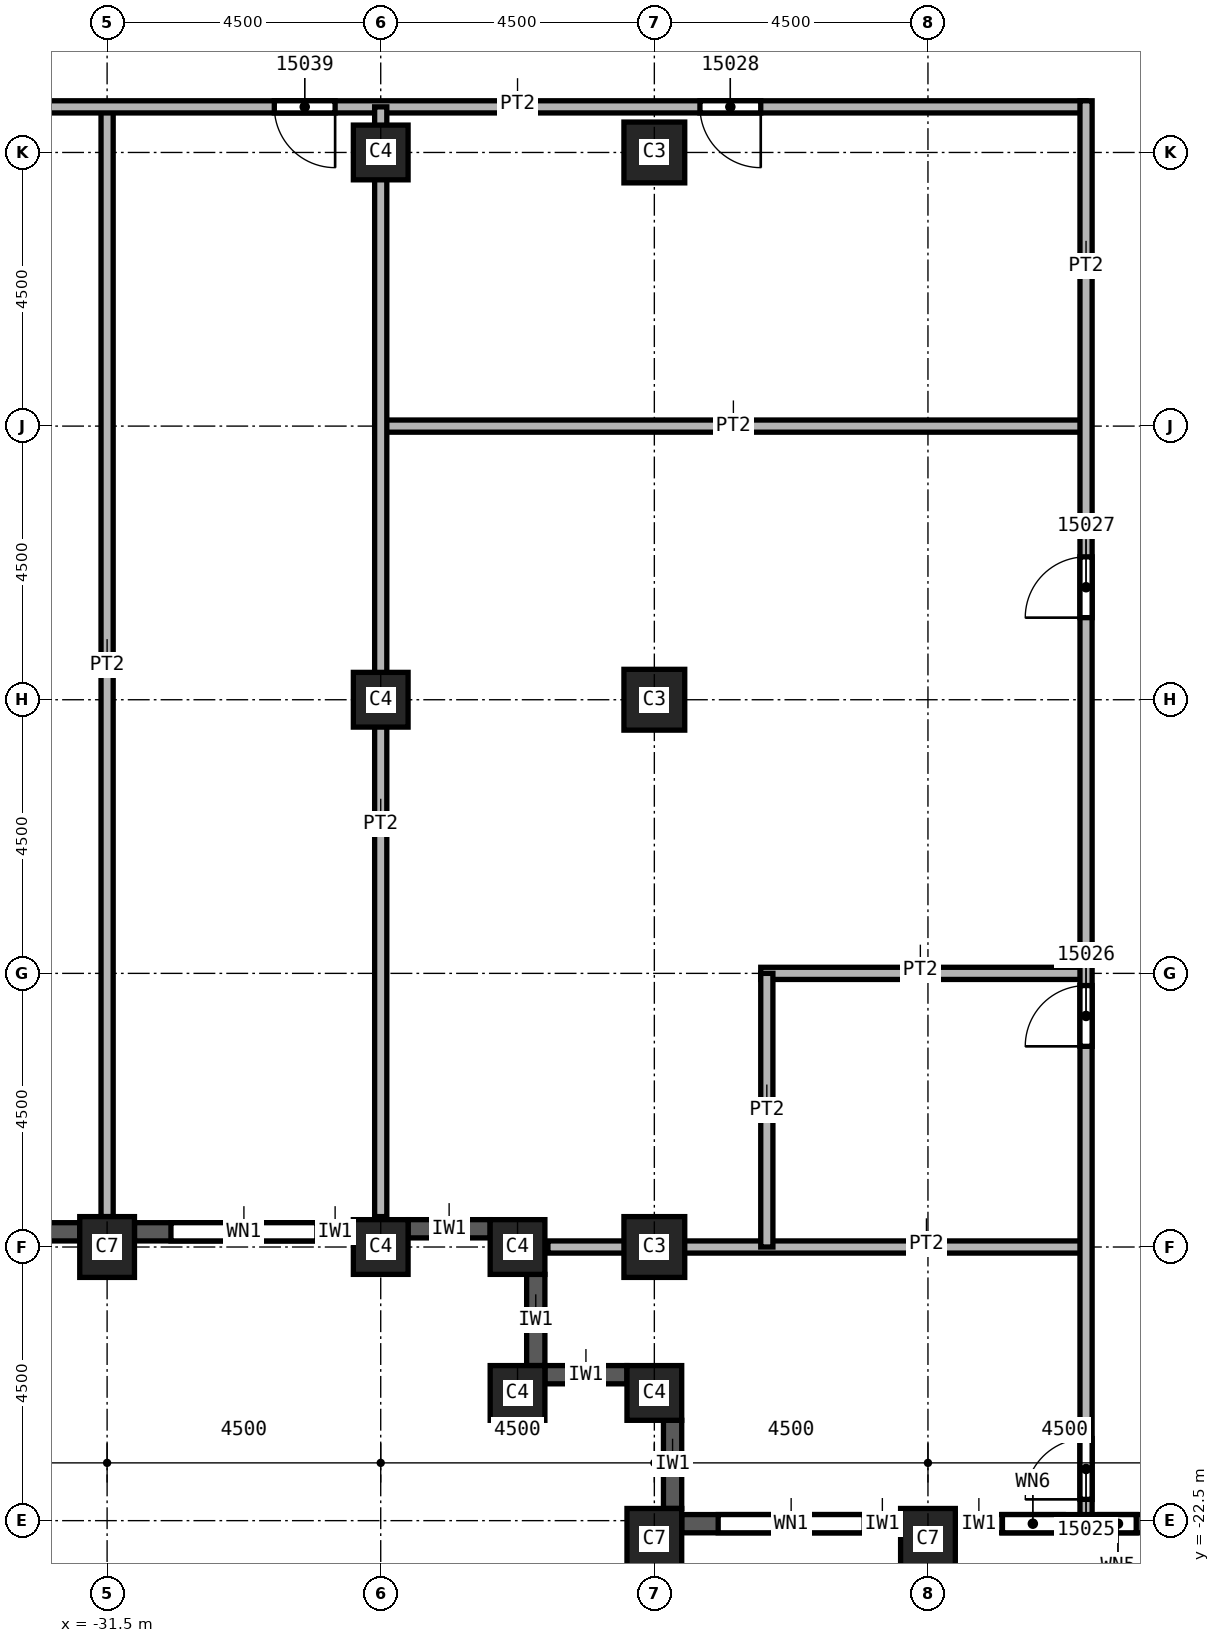
"""IFC4 building model, lengths in metres.
Left out: names, types, materials, properties, quantities, classifications, styles, units other than length and angle.
Written with IfcOpenShell. Run it as: python <this file> out.ifc"""

import sys

from ifc_helpers import new_model, si_unit, direction, frame, frame_2d, origin, origin_2d, place, context, subcontext, project, spatial, rectangle, extrude, element, fill, save


model = new_model("IFC4")
c1 = context("Model", 3, precision=1e-05, world=origin(), true_north=direction((0.0, 1.0)))
c2 = subcontext(c1, "Body", "Model", "MODEL_VIEW")
j1 = project(units=[si_unit("LENGTHUNIT", "METRE"), si_unit("PLANEANGLEUNIT", "RADIAN")], contexts=[c1])
p1 = place(None, origin())
s1 = spatial("IfcSite", under=j1, at=p1, CompositionType="ELEMENT")
p2 = place(p1, origin())
s2 = spatial("IfcBuilding", under=s1, at=p2, CompositionType="ELEMENT")
p3 = place(p2, frame((0.0, 0.0, 232.0)))
s3 = spatial("IfcBuildingStorey", under=s2, at=p3, CompositionType="ELEMENT", Elevation=232.0)
p4 = place(p3, frame((-31.5, -18.0, 0.0), z_axis=(0.0, 0.0, 1.0), x_axis=(1.0, 0.0, 0.0)))
e1 = element("IfcColumn", 1, at=p4, inside=s3, PredefinedType="COLUMN", context=c2, shape_type="SweptSolid", body=[
    extrude(rectangle(XDim=0.9, YDim=1.0, at=origin_2d()), origin(), (0.0, 0.0, 1.0), 3.6),
])
for number, where, z_axis, x_axis in (
    (2, (-22.5, 0.0, 0.0), (0.0, 0.0, 1.0), (1.0, 0.0, 0.0)),
    (3, (-22.5, -9.0, 0.0), (0.0, 0.0, 1.0), (1.0, 0.0, 0.0)),
    (4, (-22.5, -18.0, 0.0), (0.0, 0.0, 1.0), (1.0, 0.0, 0.0)),
):
    element("IfcColumn", number, at=place(p3, frame(where, z_axis=z_axis, x_axis=x_axis)), inside=s3, PredefinedType="COLUMN", context=c2, shape_type="SweptSolid", body=[
        extrude(rectangle(XDim=1.0, YDim=1.0, at=origin_2d()), origin(), (0.0, 0.0, 1.0), 3.6),
    ])
for number, where, z_axis, x_axis in (
    (5, (-18.0, -22.8, 0.0), (0.0, 0.0, 1.0), (1.0, 0.0, 0.0)),
    (6, (-22.5, -22.8, 0.0), (0.0, 0.0, 1.0), (1.0, 0.0, 0.0)),
):
    element("IfcColumn", number, at=place(p3, frame(where, z_axis=z_axis, x_axis=x_axis)), inside=s3, PredefinedType="COLUMN", context=c2, shape_type="SweptSolid", body=[
        extrude(rectangle(XDim=0.9, YDim=1.0, at=origin_2d()), origin(), (0.0, 0.0, 1.0), 3.6),
    ])
for number, where, z_axis, x_axis in (
    (7, (-27.0, 0.0, 0.0), (0.0, 0.0, 1.0), (1.0, 0.0, 0.0)),
    (8, (-27.0, -9.0, 0.0), (0.0, 0.0, 1.0), (1.0, 0.0, 0.0)),
    (9, (-27.0, -18.0, 0.0), (0.0, 0.0, 1.0), (1.0, 0.0, 0.0)),
    (10, (-22.5, -20.4, 0.0), (0.0, 0.0, 1.0), (1.0, 0.0, 0.0)),
    (11, (-24.75, -20.4, 0.0), (0.0, 0.0, 1.0), (1.0, 0.0, 0.0)),
    (12, (-24.75, -18.0, 0.0), (0.0, 0.0, 1.0), (1.0, 0.0, 0.0)),
):
    element("IfcColumn", number, at=place(p3, frame(where, z_axis=z_axis, x_axis=x_axis)), inside=s3, PredefinedType="COLUMN", context=c2, shape_type="SweptSolid", body=[
        extrude(rectangle(XDim=0.9, YDim=0.9, at=origin_2d()), origin(), (0.0, 0.0, 1.0), 3.6),
    ])
p5 = place(p3, frame((-35.55, -17.75, 0.0), z_axis=(0.0, 0.0, 1.0), x_axis=(1.0, 0.0, 0.0)))
e13 = element("IfcWall", 13, at=p5, inside=s3, PredefinedType="SOLIDWALL", context=c2, shape_type="SweptSolid", body=[
    extrude(rectangle(XDim=3.6, YDim=0.3, at=frame_2d((1.8, 0.0))), origin(), (0.0, 0.0, 1.0), 3.0),
])
p6 = place(p5, frame((0.6, 0.0, 0.8)))
e14 = element("IfcOpeningElement", 14, at=p6, cuts=e13, PredefinedType="OPENING", context=c2, shape_type="SweptSolid", body=[
    extrude(rectangle(XDim=2.4, YDim=1.95, at=frame_2d((1.2, 0.975))), frame((0.0, 0.15, 0.0), z_axis=(0.0, -1.0, 0.0), x_axis=(1.0, 0.0, 0.0)), (0.0, 0.0, 1.0), 0.3),
])
p7 = place(p3, frame((-31.05, -17.75, 0.0), z_axis=(0.0, 0.0, 1.0), x_axis=(1.0, 0.0, 0.0)))
e15 = element("IfcWall", 15, at=p7, inside=s3, PredefinedType="SOLIDWALL", context=c2, shape_type="SweptSolid", body=[
    extrude(rectangle(XDim=3.6, YDim=0.3, at=frame_2d((1.8, 0.0))), origin(), (0.0, 0.0, 1.0), 3.0),
])
p8 = place(p7, frame((0.6, 0.0, 0.8)))
e16 = element("IfcOpeningElement", 16, at=p8, cuts=e15, PredefinedType="OPENING", context=c2, shape_type="SweptSolid", body=[
    extrude(rectangle(XDim=2.4, YDim=1.95, at=frame_2d((1.2, 0.975))), frame((0.0, 0.15, 0.0), z_axis=(0.0, -1.0, 0.0), x_axis=(1.0, 0.0, 0.0)), (0.0, 0.0, 1.0), 0.3),
])
p9 = place(p3, frame((-26.55, -17.7, 0.0), z_axis=(0.0, 0.0, 1.0), x_axis=(1.0, 0.0, 0.0)))
e17 = element("IfcWall", 17, at=p9, inside=s3, PredefinedType="SOLIDWALL", context=c2, shape_type="SweptSolid", body=[
    extrude(rectangle(XDim=1.35, YDim=0.3, at=frame_2d((0.675, 0.0))), origin(), (0.0, 0.0, 1.0), 3.0),
])
p10 = place(p3, frame((-24.45, -18.45, 0.0), z_axis=(0.0, 0.0, 1.0), x_axis=(0.0, -1.0, 0.0)))
e18 = element("IfcWall", 18, at=p10, inside=s3, PredefinedType="SOLIDWALL", context=c2, shape_type="SweptSolid", body=[
    extrude(rectangle(XDim=1.5, YDim=0.3, at=frame_2d((0.75, 0.0))), origin(), (0.0, 0.0, 1.0), 3.0),
])
p11 = place(p3, frame((-24.3, -20.1, 0.0), z_axis=(0.0, 0.0, 1.0), x_axis=(1.0, 0.0, 0.0)))
e19 = element("IfcWall", 19, at=p11, inside=s3, PredefinedType="SOLIDWALL", context=c2, shape_type="SweptSolid", body=[
    extrude(rectangle(XDim=1.35, YDim=0.3, at=frame_2d((0.675, 0.0))), origin(), (0.0, 0.0, 1.0), 3.0),
])
p12 = place(p3, frame((-22.2, -20.85, 0.0), z_axis=(0.0, 0.0, 1.0), x_axis=(0.0, -1.0, 0.0)))
e20 = element("IfcWall", 20, at=p12, inside=s3, PredefinedType="SOLIDWALL", context=c2, shape_type="SweptSolid", body=[
    extrude(rectangle(XDim=1.45, YDim=0.3, at=frame_2d((0.725, 0.0))), origin(), (0.0, 0.0, 1.0), 3.0),
])
p13 = place(p3, frame((-22.05, -22.55, 0.0), z_axis=(0.0, 0.0, 1.0), x_axis=(1.0, 0.0, 0.0)))
e21 = element("IfcWall", 21, at=p13, inside=s3, PredefinedType="SOLIDWALL", context=c2, shape_type="SweptSolid", body=[
    extrude(rectangle(XDim=3.6, YDim=0.3, at=frame_2d((1.8, 0.0))), origin(), (0.0, 0.0, 1.0), 3.0),
])
p14 = place(p13, frame((0.6, 0.0, 0.8)))
e22 = element("IfcOpeningElement", 22, at=p14, cuts=e21, PredefinedType="OPENING", context=c2, shape_type="SweptSolid", body=[
    extrude(rectangle(XDim=2.4, YDim=1.95, at=frame_2d((1.2, 0.975))), frame((0.0, 0.15, 0.0), z_axis=(0.0, -1.0, 0.0), x_axis=(1.0, 0.0, 0.0)), (0.0, 0.0, 1.0), 0.3),
])
p15 = place(p3, frame((-17.55, -22.55, 0.0), z_axis=(0.0, 0.0, 1.0), x_axis=(1.0, 0.0, 0.0)))
e23 = element("IfcWall", 23, at=p15, inside=s3, PredefinedType="SOLIDWALL", context=c2, shape_type="SweptSolid", body=[
    extrude(rectangle(XDim=3.6, YDim=0.3, at=frame_2d((1.8, 0.0))), origin(), (0.0, 0.0, 1.0), 3.0),
])
p16 = place(p15, frame((0.775, 0.0, 0.8)))
e24 = element("IfcOpeningElement", 24, at=p16, cuts=e23, PredefinedType="OPENING", context=c2, shape_type="SweptSolid", body=[
    extrude(rectangle(XDim=1.0, YDim=1.95, at=frame_2d((0.5, 0.975))), frame((0.0, 0.15, 0.0), z_axis=(0.0, -1.0, 0.0), x_axis=(1.0, 0.0, 0.0)), (0.0, 0.0, 1.0), 0.3),
])
p17 = place(p15, frame((2.375, 0.0, 0.8)))
e25 = element("IfcOpeningElement", 25, at=p17, cuts=e23, PredefinedType="OPENING", context=c2, shape_type="SweptSolid", body=[
    extrude(rectangle(XDim=0.6, YDim=1.95, at=frame_2d((0.3, 0.975))), frame((0.0, 0.15, 0.0), z_axis=(0.0, -1.0, 0.0), x_axis=(1.0, 0.0, 0.0)), (0.0, 0.0, 1.0), 0.3),
])
p18 = place(p3, frame((-31.5, 0.75, 0.0), z_axis=(0.0, 0.0, 1.0), x_axis=(0.0, -1.0, 0.0)))
e26 = element("IfcWall", 26, at=p18, inside=s3, PredefinedType="PARTITIONING", context=c2, shape_type="SweptSolid", body=[
    extrude(rectangle(XDim=18.25, YDim=0.2, at=frame_2d((9.125, 0.0))), origin(), (0.0, 0.0, 1.0), 3.6),
])
p19 = place(p3, frame((-15.4, 0.75, 0.0), z_axis=(0.0, 0.0, 1.0), x_axis=(-1.0, 0.0, 0.0)))
e27 = element("IfcWall", 27, at=p19, inside=s3, PredefinedType="PARTITIONING", context=c2, shape_type="SweptSolid", body=[
    extrude(rectangle(XDim=18.45, YDim=0.2, at=frame_2d((9.225, 0.0))), origin(), (0.0, 0.0, 1.0), 3.6),
])
p20 = place(p19, frame((5.35, 0.0, 0.0)))
e28 = element("IfcOpeningElement", 28, at=p20, cuts=e27, PredefinedType="OPENING", context=c2, shape_type="SweptSolid", body=[
    extrude(rectangle(XDim=1.0, YDim=2.1, at=frame_2d((0.5, 1.05))), frame((0.0, 0.1, 0.0), z_axis=(0.0, -1.0, 0.0), x_axis=(1.0, 0.0, 0.0)), (0.0, 0.0, 1.0), 0.2),
])
p21 = place(p19, frame((12.35, 0.0, 0.0)))
e29 = element("IfcOpeningElement", 29, at=p21, cuts=e27, PredefinedType="OPENING", context=c2, shape_type="SweptSolid", body=[
    extrude(rectangle(XDim=1.0, YDim=2.1, at=frame_2d((0.5, 1.05))), frame((0.0, 0.1, 0.0), z_axis=(0.0, -1.0, 0.0), x_axis=(1.0, 0.0, 0.0)), (0.0, 0.0, 1.0), 0.2),
])
p22 = place(p3, frame((-27.1, -4.5, 0.0), z_axis=(0.0, 0.0, 1.0), x_axis=(1.0, 0.0, 0.0)))
e30 = element("IfcWall", 30, at=p22, inside=s3, PredefinedType="PARTITIONING", context=c2, shape_type="SweptSolid", body=[
    extrude(rectangle(XDim=11.7, YDim=0.2, at=frame_2d((5.85, 0.0))), origin(), (0.0, 0.0, 1.0), 3.6),
])
p23 = place(p3, frame((-27.0, -17.5, 0.0), z_axis=(0.0, 0.0, 1.0), x_axis=(0.0, 1.0, 0.0)))
e31 = element("IfcWall", 31, at=p23, inside=s3, PredefinedType="PARTITIONING", context=c2, shape_type="SweptSolid", body=[
    extrude(rectangle(XDim=18.25, YDim=0.2, at=frame_2d((9.125, 0.0))), origin(), (0.0, 0.0, 1.0), 3.6),
])
p24 = place(p3, frame((-24.25, -18.0, 0.0), z_axis=(0.0, 0.0, 1.0), x_axis=(1.0, 0.0, 0.0)))
e32 = element("IfcWall", 32, at=p24, inside=s3, PredefinedType="PARTITIONING", context=c2, shape_type="SweptSolid", body=[
    extrude(rectangle(XDim=8.85, YDim=0.2, at=frame_2d((4.425, 0.0))), origin(), (0.0, 0.0, 1.0), 3.6),
])
p25 = place(p3, frame((-20.75, -13.5, 0.0), z_axis=(0.0, 0.0, 1.0), x_axis=(1.0, 0.0, 0.0)))
e33 = element("IfcWall", 33, at=p25, inside=s3, PredefinedType="PARTITIONING", context=c2, shape_type="SweptSolid", body=[
    extrude(rectangle(XDim=5.35, YDim=0.2, at=frame_2d((2.675, 0.0))), origin(), (0.0, 0.0, 1.0), 3.6),
])
p26 = place(p3, frame((-20.65, -18.0, 0.0), z_axis=(0.0, 0.0, 1.0), x_axis=(0.0, 1.0, 0.0)))
e34 = element("IfcWall", 34, at=p26, inside=s3, PredefinedType="PARTITIONING", context=c2, shape_type="SweptSolid", body=[
    extrude(rectangle(XDim=4.5, YDim=0.2, at=frame_2d((2.25, 0.0))), origin(), (0.0, 0.0, 1.0), 3.6),
])
p27 = place(p3, frame((-15.4, -22.4, 0.0), z_axis=(0.0, 0.0, 1.0), x_axis=(0.0, 1.0, 0.0)))
e35 = element("IfcWall", 35, at=p27, inside=s3, PredefinedType="PARTITIONING", context=c2, shape_type="SweptSolid", body=[
    extrude(rectangle(XDim=23.25, YDim=0.2, at=frame_2d((11.625, 0.0))), origin(), (0.0, 0.0, 1.0), 3.6),
])
p28 = place(p27, frame((0.25, 0.0, 0.0)))
e36 = element("IfcOpeningElement", 36, at=p28, cuts=e35, PredefinedType="OPENING", context=c2, shape_type="SweptSolid", body=[
    extrude(rectangle(XDim=1.0, YDim=2.1, at=frame_2d((0.5, 1.05))), frame((0.0, 0.1, 0.0), z_axis=(0.0, -1.0, 0.0), x_axis=(1.0, 0.0, 0.0)), (0.0, 0.0, 1.0), 0.2),
])
p29 = place(p27, frame((7.7, 0.0, 0.0)))
e37 = element("IfcOpeningElement", 37, at=p29, cuts=e35, PredefinedType="OPENING", context=c2, shape_type="SweptSolid", body=[
    extrude(rectangle(XDim=1.0, YDim=2.1, at=frame_2d((0.5, 1.05))), frame((0.0, 0.1, 0.0), z_axis=(0.0, -1.0, 0.0), x_axis=(1.0, 0.0, 0.0)), (0.0, 0.0, 1.0), 0.2),
])
p30 = place(p27, frame((14.75, 0.0, 0.0)))
e38 = element("IfcOpeningElement", 38, at=p30, cuts=e35, PredefinedType="OPENING", context=c2, shape_type="SweptSolid", body=[
    extrude(rectangle(XDim=1.0, YDim=2.1, at=frame_2d((0.5, 1.05))), frame((0.0, 0.1, 0.0), z_axis=(0.0, -1.0, 0.0), x_axis=(1.0, 0.0, 0.0)), (0.0, 0.0, 1.0), 0.2),
])
p31 = place(p8, origin())
e39 = element("IfcWindow", 39, at=p31, inside=s3, PartitioningType="SINGLE_PANEL", PredefinedType="WINDOW", context=c2, shape_type="SweptSolid", body=[
    extrude(rectangle(XDim=2.4, YDim=1.95, at=frame_2d((1.2, 0.975))), frame((0.0, 0.03, 0.0), z_axis=(0.0, -1.0, 0.0), x_axis=(1.0, 0.0, 0.0)), (0.0, 0.0, 1.0), 0.06),
])
fill(e16, e39)
p32 = place(p14, origin())
e40 = element("IfcWindow", 40, at=p32, inside=s3, PartitioningType="SINGLE_PANEL", PredefinedType="WINDOW", context=c2, shape_type="SweptSolid", body=[
    extrude(rectangle(XDim=2.4, YDim=1.95, at=frame_2d((1.2, 0.975))), frame((0.0, 0.03, 0.0), z_axis=(0.0, -1.0, 0.0), x_axis=(1.0, 0.0, 0.0)), (0.0, 0.0, 1.0), 0.06),
])
fill(e22, e40)
p33 = place(p28, origin())
e41 = element("IfcDoor", 41, at=p33, inside=s3, OperationType="SINGLE_SWING_RIGHT", PredefinedType="DOOR", context=c2, shape_type="SweptSolid", body=[
    extrude(rectangle(XDim=1.0, YDim=2.1, at=frame_2d((0.5, 1.05))), frame((0.0, 0.025, 0.0), z_axis=(0.0, -1.0, 0.0), x_axis=(1.0, 0.0, 0.0)), (0.0, 0.0, 1.0), 0.05),
])
fill(e36, e41)
p34 = place(p29, origin())
e42 = element("IfcDoor", 42, at=p34, inside=s3, OperationType="SINGLE_SWING_LEFT", PredefinedType="DOOR", context=c2, shape_type="SweptSolid", body=[
    extrude(rectangle(XDim=1.0, YDim=2.1, at=frame_2d((0.5, 1.05))), frame((0.0, 0.025, 0.0), z_axis=(0.0, -1.0, 0.0), x_axis=(1.0, 0.0, 0.0)), (0.0, 0.0, 1.0), 0.05),
])
fill(e37, e42)
p35 = place(p30, origin())
e43 = element("IfcDoor", 43, at=p35, inside=s3, OperationType="SINGLE_SWING_RIGHT", PredefinedType="DOOR", context=c2, shape_type="SweptSolid", body=[
    extrude(rectangle(XDim=1.0, YDim=2.1, at=frame_2d((0.5, 1.05))), frame((0.0, 0.025, 0.0), z_axis=(0.0, -1.0, 0.0), x_axis=(1.0, 0.0, 0.0)), (0.0, 0.0, 1.0), 0.05),
])
fill(e38, e43)
p36 = place(p20, origin())
e44 = element("IfcDoor", 44, at=p36, inside=s3, OperationType="SINGLE_SWING_LEFT", PredefinedType="DOOR", context=c2, shape_type="SweptSolid", body=[
    extrude(rectangle(XDim=1.0, YDim=2.1, at=frame_2d((0.5, 1.05))), frame((0.0, 0.025, 0.0), z_axis=(0.0, -1.0, 0.0), x_axis=(1.0, 0.0, 0.0)), (0.0, 0.0, 1.0), 0.05),
])
fill(e28, e44)
p37 = place(p21, origin())
e45 = element("IfcDoor", 45, at=p37, inside=s3, OperationType="SINGLE_SWING_RIGHT", PredefinedType="DOOR", context=c2, shape_type="SweptSolid", body=[
    extrude(rectangle(XDim=1.0, YDim=2.1, at=frame_2d((0.5, 1.05))), frame((0.0, 0.025, 0.0), z_axis=(0.0, -1.0, 0.0), x_axis=(1.0, 0.0, 0.0)), (0.0, 0.0, 1.0), 0.05),
])
fill(e29, e45)
p38 = place(p16, origin())
e46 = element("IfcWindow", 46, at=p38, inside=s3, PartitioningType="SINGLE_PANEL", PredefinedType="WINDOW", context=c2, shape_type="SweptSolid", body=[
    extrude(rectangle(XDim=1.0, YDim=1.95, at=frame_2d((0.5, 0.975))), frame((0.0, 0.03, 0.0), z_axis=(0.0, -1.0, 0.0), x_axis=(1.0, 0.0, 0.0)), (0.0, 0.0, 1.0), 0.06),
])
fill(e24, e46)
p39 = place(p17, origin())
e47 = element("IfcWindow", 47, at=p39, inside=s3, PartitioningType="SINGLE_PANEL", PredefinedType="WINDOW", context=c2, shape_type="SweptSolid", body=[
    extrude(rectangle(XDim=0.6, YDim=1.95, at=frame_2d((0.3, 0.975))), frame((0.0, 0.03, 0.0), z_axis=(0.0, -1.0, 0.0), x_axis=(1.0, 0.0, 0.0)), (0.0, 0.0, 1.0), 0.06),
])
fill(e25, e47)
save(model, sys.argv[1])
